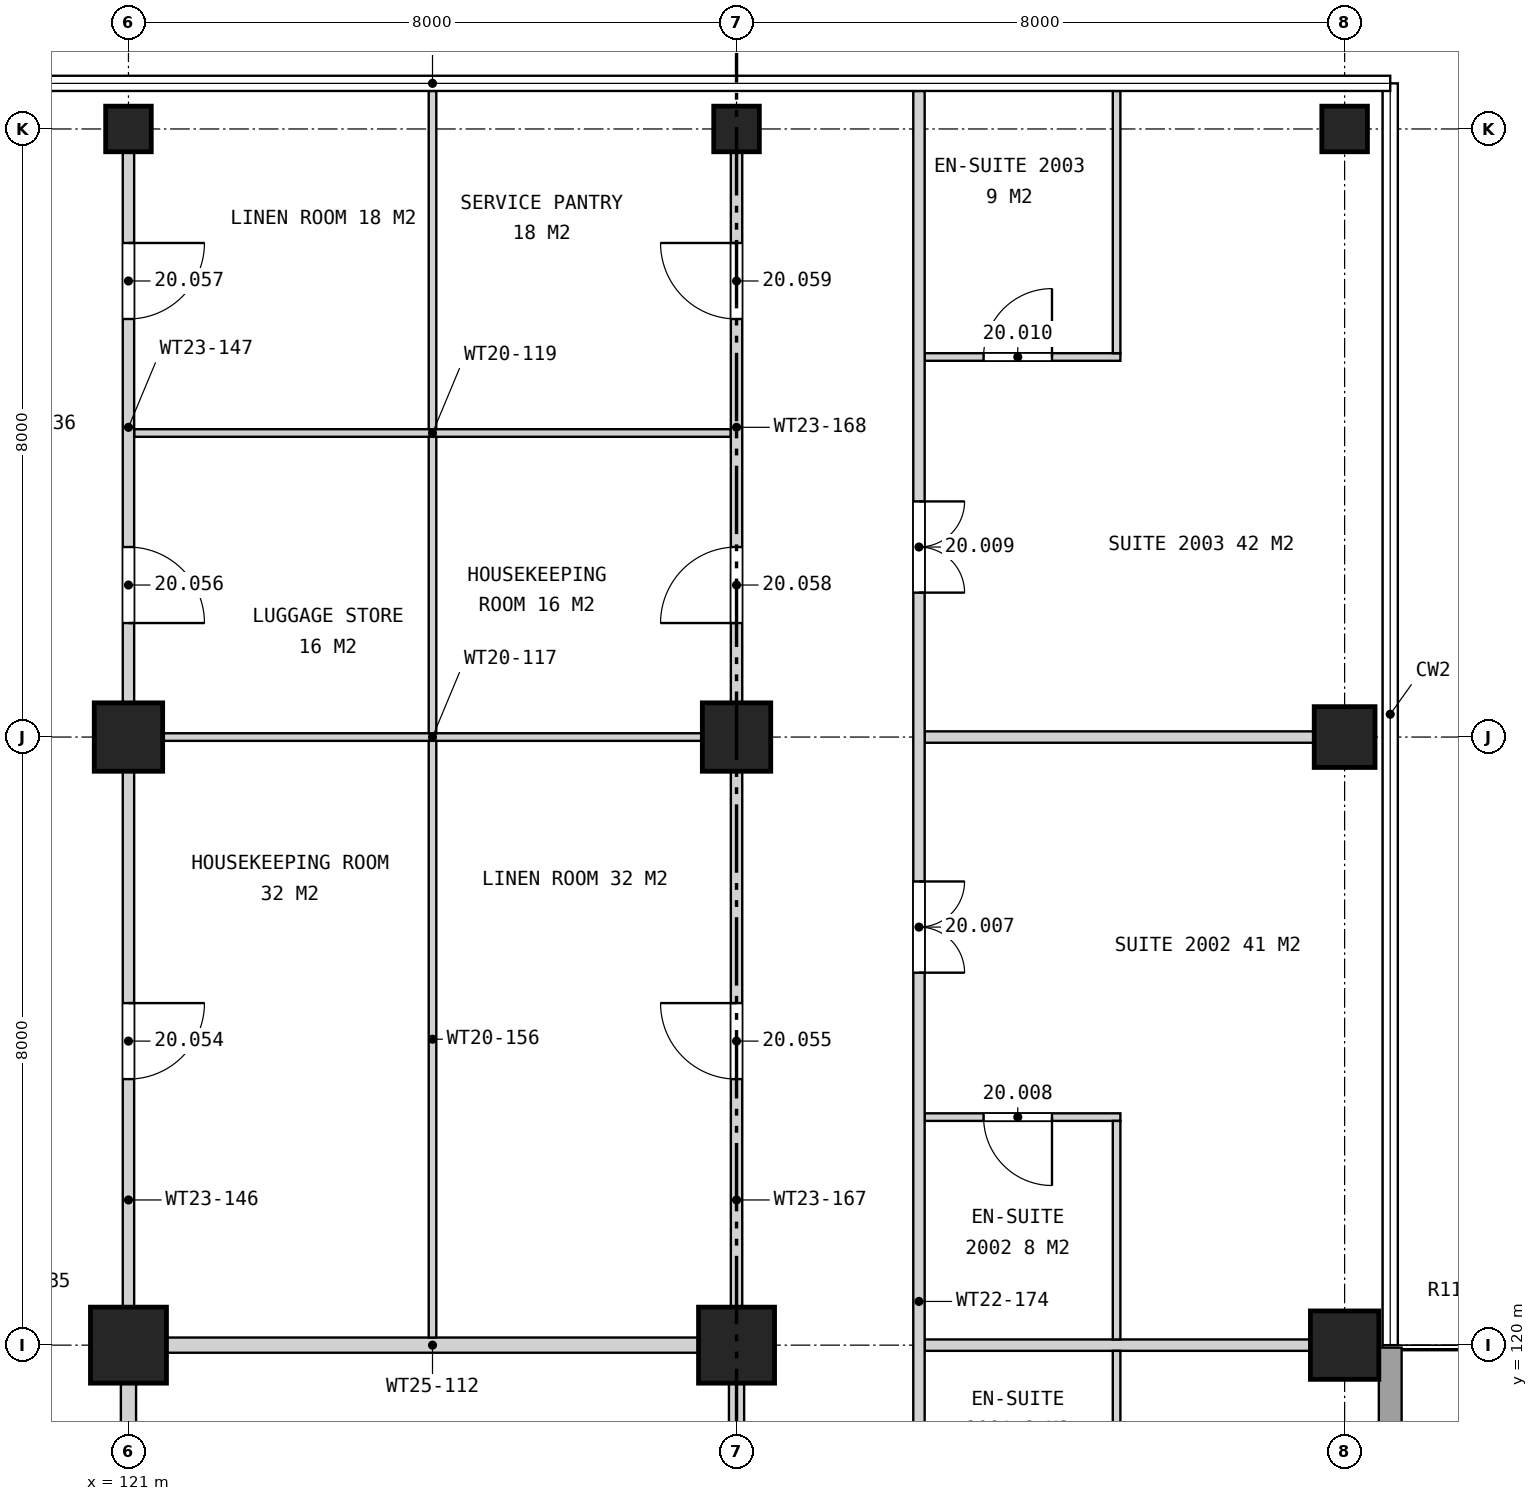
"""IFC4 building model, lengths in metres.
Left out: names, types, materials, properties, quantities, classifications, styles, units other than length and angle.
Written with IfcOpenShell. Run it as: python <this file> out.ifc"""

import sys

from ifc_helpers import new_model, si_unit, direction, frame, frame_2d, origin, origin_2d, place, context, subcontext, project, spatial, rectangle, extrude, element, fill, save


model = new_model("IFC4")
c1 = context("Model", 3, precision=1e-05, world=origin(), true_north=direction((0.0, 1.0)))
c2 = subcontext(c1, "Body", "Model", "MODEL_VIEW")
j1 = project(units=[si_unit("LENGTHUNIT", "METRE"), si_unit("PLANEANGLEUNIT", "RADIAN")], contexts=[c1])
p1 = place(None, origin())
s1 = spatial("IfcSite", under=j1, at=p1, CompositionType="ELEMENT")
p2 = place(p1, origin())
s2 = spatial("IfcBuilding", under=s1, at=p2, CompositionType="ELEMENT")
p3 = place(p2, frame((0.0, 0.0, 101.6)))
s3 = spatial("IfcBuildingStorey", under=s2, at=p3, CompositionType="ELEMENT", Elevation=101.6)
p4 = place(p3, frame((121.0, 120.0, 0.0), z_axis=(0.0, 0.0, 1.0), x_axis=(1.0, 0.0, 0.0)))
e1 = element("IfcColumn", 1, at=p4, inside=s3, PredefinedType="COLUMN", context=c2, shape_type="SweptSolid", body=[
    extrude(rectangle(XDim=1.0, YDim=1.0, at=origin_2d()), origin(), (0.0, 0.0, 1.0), 3.7),
])
p5 = place(p3, frame((121.0, 128.0, 0.0), z_axis=(0.0, 0.0, 1.0), x_axis=(1.0, 0.0, 0.0)))
e2 = element("IfcColumn", 2, at=p5, inside=s3, PredefinedType="COLUMN", context=c2, shape_type="SweptSolid", body=[
    extrude(rectangle(XDim=0.9, YDim=0.9, at=origin_2d()), origin(), (0.0, 0.0, 1.0), 3.7),
])
p6 = place(p3, frame((121.0, 136.0, 0.0), z_axis=(0.0, 0.0, 1.0), x_axis=(1.0, 0.0, 0.0)))
e3 = element("IfcColumn", 3, at=p6, inside=s3, PredefinedType="COLUMN", context=c2, shape_type="SweptSolid", body=[
    extrude(rectangle(XDim=0.6, YDim=0.6, at=origin_2d()), origin(), (0.0, 0.0, 1.0), 3.7),
])
p7 = place(p3, frame((129.0, 120.0, 0.0), z_axis=(0.0, 0.0, 1.0), x_axis=(1.0, 0.0, 0.0)))
e4 = element("IfcColumn", 4, at=p7, inside=s3, PredefinedType="COLUMN", context=c2, shape_type="SweptSolid", body=[
    extrude(rectangle(XDim=1.0, YDim=1.0, at=origin_2d()), origin(), (0.0, 0.0, 1.0), 3.7),
])
p8 = place(p3, frame((129.0, 128.0, 0.0), z_axis=(0.0, 0.0, 1.0), x_axis=(1.0, 0.0, 0.0)))
e5 = element("IfcColumn", 5, at=p8, inside=s3, PredefinedType="COLUMN", context=c2, shape_type="SweptSolid", body=[
    extrude(rectangle(XDim=0.9, YDim=0.9, at=origin_2d()), origin(), (0.0, 0.0, 1.0), 3.7),
])
p9 = place(p3, frame((129.0, 136.0, 0.0), z_axis=(0.0, 0.0, 1.0), x_axis=(1.0, 0.0, 0.0)))
e6 = element("IfcColumn", 6, at=p9, inside=s3, PredefinedType="COLUMN", context=c2, shape_type="SweptSolid", body=[
    extrude(rectangle(XDim=0.6, YDim=0.6, at=origin_2d()), origin(), (0.0, 0.0, 1.0), 3.7),
])
p10 = place(p3, frame((137.0, 120.0, 0.0), z_axis=(0.0, 0.0, 1.0), x_axis=(1.0, 0.0, 0.0)))
e7 = element("IfcColumn", 7, at=p10, inside=s3, PredefinedType="COLUMN", context=c2, shape_type="SweptSolid", body=[
    extrude(rectangle(XDim=0.9, YDim=0.9, at=origin_2d()), origin(), (0.0, 0.0, 1.0), 3.7),
])
p11 = place(p3, frame((137.0, 128.0, 0.0), z_axis=(0.0, 0.0, 1.0), x_axis=(1.0, 0.0, 0.0)))
e8 = element("IfcColumn", 8, at=p11, inside=s3, PredefinedType="COLUMN", context=c2, shape_type="SweptSolid", body=[
    extrude(rectangle(XDim=0.8, YDim=0.8, at=origin_2d()), origin(), (0.0, 0.0, 1.0), 3.7),
])
p12 = place(p3, frame((137.0, 136.0, 0.0), z_axis=(0.0, 0.0, 1.0), x_axis=(1.0, 0.0, 0.0)))
e9 = element("IfcColumn", 9, at=p12, inside=s3, PredefinedType="COLUMN", context=c2, shape_type="SweptSolid", body=[
    extrude(rectangle(XDim=0.6, YDim=0.6, at=origin_2d()), origin(), (0.0, 0.0, 1.0), 3.7),
])
p13 = place(p3, frame((137.6, 112.4, 0.0), z_axis=(0.0, 0.0, 1.0), x_axis=(0.0, 1.0, 0.0)))
e10 = element("IfcWall", 10, at=p13, inside=s3, PredefinedType="SOLIDWALL", context=c2, shape_type="SweptSolid", body=[
    extrude(rectangle(XDim=7.568, YDim=0.3, at=frame_2d((3.784, 0.0))), origin(), (0.0, 0.0, 1.0), 3.3),
])
p14 = place(p13, frame((2.55, 0.0, 0.0)))
e11 = element("IfcOpeningElement", 11, at=p14, cuts=e10, PredefinedType="OPENING", context=c2, shape_type="SweptSolid", body=[
    extrude(rectangle(XDim=2.1, YDim=2.4, at=frame_2d((1.05, 1.2))), frame((0.0, 0.16, 0.0), z_axis=(0.0, -1.0, 0.0), x_axis=(1.0, 0.0, 0.0)), (0.0, 0.0, 1.0), 0.32),
])
p15 = place(p3, frame((121.5, 120.0, 0.0), z_axis=(0.0, 0.0, 1.0), x_axis=(1.0, 0.0, 0.0)))
e12 = element("IfcWall", 12, at=p15, inside=s3, PredefinedType="PARTITIONING", context=c2, shape_type="SweptSolid", body=[
    extrude(rectangle(XDim=7.0, YDim=0.2, at=frame_2d((3.5, 0.0))), origin(), (0.0, 0.0, 1.0), 2.76),
])
p16 = place(p3, frame((131.475, 120.0, 0.0), z_axis=(0.0, 0.0, 1.0), x_axis=(1.0, 0.0, 0.0)))
e13 = element("IfcWall", 13, at=p16, inside=s3, PredefinedType="PARTITIONING", context=c2, shape_type="SweptSolid", body=[
    extrude(rectangle(XDim=5.075, YDim=0.15, at=frame_2d((2.538, 0.0))), origin(), (0.0, 0.0, 1.0), 2.76),
])
p17 = place(p3, frame((131.475, 123.0, 0.0), z_axis=(0.0, 0.0, 1.0), x_axis=(1.0, 0.0, 0.0)))
e14 = element("IfcWall", 14, at=p17, inside=s3, PredefinedType="PLUMBINGWALL", context=c2, shape_type="SweptSolid", body=[
    extrude(rectangle(XDim=2.575, YDim=0.1, at=frame_2d((1.288, 0.0))), origin(), (0.0, 0.0, 1.0), 3.7),
])
p18 = place(p17, frame((0.775, 0.0, 0.0)))
e15 = element("IfcOpeningElement", 15, at=p18, cuts=e14, PredefinedType="OPENING", context=c2, shape_type="SweptSolid", body=[
    extrude(rectangle(XDim=0.9, YDim=2.1, at=frame_2d((0.45, 1.05))), frame((0.0, 0.06, 0.0), z_axis=(0.0, -1.0, 0.0), x_axis=(1.0, 0.0, 0.0)), (0.0, 0.0, 1.0), 0.12),
])
p19 = place(p3, frame((121.45, 128.0, 0.0), z_axis=(0.0, 0.0, 1.0), x_axis=(1.0, 0.0, 0.0)))
e16 = element("IfcWall", 16, at=p19, inside=s3, PredefinedType="PARTITIONING", context=c2, shape_type="SweptSolid", body=[
    extrude(rectangle(XDim=7.1, YDim=0.1, at=frame_2d((3.55, 0.0))), origin(), (0.0, 0.0, 1.0), 2.76),
])
p20 = place(p3, frame((131.475, 128.0, 0.0), z_axis=(0.0, 0.0, 1.0), x_axis=(1.0, 0.0, 0.0)))
e17 = element("IfcWall", 17, at=p20, inside=s3, PredefinedType="PARTITIONING", context=c2, shape_type="SweptSolid", body=[
    extrude(rectangle(XDim=5.125, YDim=0.15, at=frame_2d((2.562, 0.0))), origin(), (0.0, 0.0, 1.0), 2.76),
])
p21 = place(p3, frame((121.075, 132.0, 0.0), z_axis=(0.0, 0.0, 1.0), x_axis=(1.0, 0.0, 0.0)))
e18 = element("IfcWall", 18, at=p21, inside=s3, PredefinedType="PARTITIONING", context=c2, shape_type="SweptSolid", body=[
    extrude(rectangle(XDim=7.85, YDim=0.1, at=frame_2d((3.925, 0.0))), origin(), (0.0, 0.0, 1.0), 2.843),
])
p22 = place(p3, frame((131.475, 133.0, 0.0), z_axis=(0.0, 0.0, 1.0), x_axis=(1.0, 0.0, 0.0)))
e19 = element("IfcWall", 19, at=p22, inside=s3, PredefinedType="PLUMBINGWALL", context=c2, shape_type="SweptSolid", body=[
    extrude(rectangle(XDim=2.575, YDim=0.1, at=frame_2d((1.288, 0.0))), origin(), (0.0, 0.0, 1.0), 3.7),
])
p23 = place(p22, frame((0.775, 0.0, 0.0)))
e20 = element("IfcOpeningElement", 20, at=p23, cuts=e19, PredefinedType="OPENING", context=c2, shape_type="SweptSolid", body=[
    extrude(rectangle(XDim=0.9, YDim=2.1, at=frame_2d((0.45, 1.05))), frame((0.0, 0.06, 0.0), z_axis=(0.0, -1.0, 0.0), x_axis=(1.0, 0.0, 0.0)), (0.0, 0.0, 1.0), 0.12),
])
p24 = place(p3, frame((121.0, 112.5, 0.0), z_axis=(0.0, 0.0, 1.0), x_axis=(0.0, 1.0, 0.0)))
e21 = element("IfcWall", 21, at=p24, inside=s3, PredefinedType="PARTITIONING", context=c2, shape_type="SweptSolid", body=[
    extrude(rectangle(XDim=7.0, YDim=0.2, at=frame_2d((3.5, 0.0))), origin(), (0.0, 0.0, 1.0), 2.76),
])
p25 = place(p24, frame((3.0, 0.0, 0.0)))
e22 = element("IfcOpeningElement", 22, at=p25, cuts=e21, PredefinedType="OPENING", context=c2, shape_type="SweptSolid", body=[
    extrude(rectangle(XDim=1.0, YDim=2.1, at=frame_2d((0.5, 1.05))), frame((0.0, 0.11, 0.0), z_axis=(0.0, -1.0, 0.0), x_axis=(1.0, 0.0, 0.0)), (0.0, 0.0, 1.0), 0.22),
])
p26 = place(p3, frame((121.0, 120.5, 0.0), z_axis=(0.0, 0.0, 1.0), x_axis=(0.0, 1.0, 0.0)))
e23 = element("IfcWall", 23, at=p26, inside=s3, PredefinedType="PARTITIONING", context=c2, shape_type="SweptSolid", body=[
    extrude(rectangle(XDim=7.05, YDim=0.15, at=frame_2d((3.525, 0.0))), origin(), (0.0, 0.0, 1.0), 2.76),
])
p27 = place(p26, frame((3.0, 0.0, 0.0)))
e24 = element("IfcOpeningElement", 24, at=p27, cuts=e23, PredefinedType="OPENING", context=c2, shape_type="SweptSolid", body=[
    extrude(rectangle(XDim=1.0, YDim=2.1, at=frame_2d((0.5, 1.05))), frame((0.0, 0.085, 0.0), z_axis=(0.0, -1.0, 0.0), x_axis=(1.0, 0.0, 0.0)), (0.0, 0.0, 1.0), 0.17),
])
p28 = place(p3, frame((121.0, 128.45, 0.0), z_axis=(0.0, 0.0, 1.0), x_axis=(0.0, 1.0, 0.0)))
e25 = element("IfcWall", 25, at=p28, inside=s3, PredefinedType="PARTITIONING", context=c2, shape_type="SweptSolid", body=[
    extrude(rectangle(XDim=7.25, YDim=0.15, at=frame_2d((3.625, 0.0))), origin(), (0.0, 0.0, 1.0), 2.76),
])
p29 = place(p28, frame((1.05, 0.0, 0.0)))
e26 = element("IfcOpeningElement", 26, at=p29, cuts=e25, PredefinedType="OPENING", context=c2, shape_type="SweptSolid", body=[
    extrude(rectangle(XDim=1.0, YDim=2.1, at=frame_2d((0.5, 1.05))), frame((0.0, 0.085, 0.0), z_axis=(0.0, -1.0, 0.0), x_axis=(1.0, 0.0, 0.0)), (0.0, 0.0, 1.0), 0.17),
])
p30 = place(p28, frame((5.05, 0.0, 0.0)))
e27 = element("IfcOpeningElement", 27, at=p30, cuts=e25, PredefinedType="OPENING", context=c2, shape_type="SweptSolid", body=[
    extrude(rectangle(XDim=1.0, YDim=2.1, at=frame_2d((0.5, 1.05))), frame((0.0, 0.085, 0.0), z_axis=(0.0, -1.0, 0.0), x_axis=(1.0, 0.0, 0.0)), (0.0, 0.0, 1.0), 0.17),
])
p31 = place(p3, frame((125.0, 120.1, 0.0), z_axis=(0.0, 0.0, 1.0), x_axis=(0.0, 1.0, 0.0)))
e28 = element("IfcWall", 28, at=p31, inside=s3, PredefinedType="PARTITIONING", context=c2, shape_type="SweptSolid", body=[
    extrude(rectangle(XDim=7.85, YDim=0.1, at=frame_2d((3.925, 0.0))), origin(), (0.0, 0.0, 1.0), 2.76),
])
p32 = place(p3, frame((125.0, 128.05, 0.0), z_axis=(0.0, 0.0, 1.0), x_axis=(0.0, 1.0, 0.0)))
e29 = element("IfcWall", 29, at=p32, inside=s3, PredefinedType="PARTITIONING", context=c2, shape_type="SweptSolid", body=[
    extrude(rectangle(XDim=3.9, YDim=0.1, at=frame_2d((1.95, 0.0))), origin(), (0.0, 0.0, 1.0), 2.76),
])
p33 = place(p3, frame((125.0, 132.05, 0.0), z_axis=(0.0, 0.0, 1.0), x_axis=(0.0, 1.0, 0.0)))
e30 = element("IfcWall", 30, at=p33, inside=s3, PredefinedType="PARTITIONING", context=c2, shape_type="SweptSolid", body=[
    extrude(rectangle(XDim=4.45, YDim=0.1, at=frame_2d((2.225, 0.0))), origin(), (0.0, 0.0, 1.0), 3.7),
])
p34 = place(p3, frame((129.0, 112.5, 0.0), z_axis=(0.0, 0.0, 1.0), x_axis=(0.0, 1.0, 0.0)))
e31 = element("IfcWall", 31, at=p34, inside=s3, PredefinedType="PARTITIONING", context=c2, shape_type="SweptSolid", body=[
    extrude(rectangle(XDim=7.0, YDim=0.2, at=frame_2d((3.5, 0.0))), origin(), (0.0, 0.0, 1.0), 2.76),
])
p35 = place(p3, frame((129.0, 120.5, 0.0), z_axis=(0.0, 0.0, 1.0), x_axis=(0.0, 1.0, 0.0)))
e32 = element("IfcWall", 32, at=p35, inside=s3, PredefinedType="PARTITIONING", context=c2, shape_type="SweptSolid", body=[
    extrude(rectangle(XDim=7.05, YDim=0.15, at=frame_2d((3.525, 0.0))), origin(), (0.0, 0.0, 1.0), 2.76),
])
p36 = place(p35, frame((3.0, 0.0, 0.0)))
e33 = element("IfcOpeningElement", 33, at=p36, cuts=e32, PredefinedType="OPENING", context=c2, shape_type="SweptSolid", body=[
    extrude(rectangle(XDim=1.0, YDim=2.1, at=frame_2d((0.5, 1.05))), frame((0.0, 0.085, 0.0), z_axis=(0.0, -1.0, 0.0), x_axis=(1.0, 0.0, 0.0)), (0.0, 0.0, 1.0), 0.17),
])
p37 = place(p3, frame((129.0, 128.45, 0.0), z_axis=(0.0, 0.0, 1.0), x_axis=(0.0, 1.0, 0.0)))
e34 = element("IfcWall", 34, at=p37, inside=s3, PredefinedType="PARTITIONING", context=c2, shape_type="SweptSolid", body=[
    extrude(rectangle(XDim=7.25, YDim=0.15, at=frame_2d((3.625, 0.0))), origin(), (0.0, 0.0, 1.0), 2.76),
])
p38 = place(p37, frame((1.05, 0.0, 0.0)))
e35 = element("IfcOpeningElement", 35, at=p38, cuts=e34, PredefinedType="OPENING", context=c2, shape_type="SweptSolid", body=[
    extrude(rectangle(XDim=1.0, YDim=2.1, at=frame_2d((0.5, 1.05))), frame((0.0, 0.085, 0.0), z_axis=(0.0, -1.0, 0.0), x_axis=(1.0, 0.0, 0.0)), (0.0, 0.0, 1.0), 0.17),
])
p39 = place(p37, frame((5.05, 0.0, 0.0)))
e36 = element("IfcOpeningElement", 36, at=p39, cuts=e34, PredefinedType="OPENING", context=c2, shape_type="SweptSolid", body=[
    extrude(rectangle(XDim=1.0, YDim=2.1, at=frame_2d((0.5, 1.05))), frame((0.0, 0.085, 0.0), z_axis=(0.0, -1.0, 0.0), x_axis=(1.0, 0.0, 0.0)), (0.0, 0.0, 1.0), 0.17),
])
p40 = place(p3, frame((131.4, 112.0, 0.0), z_axis=(0.0, 0.0, 1.0), x_axis=(0.0, 1.0, 0.0)))
e37 = element("IfcWall", 37, at=p40, inside=s3, PredefinedType="PARTITIONING", context=c2, shape_type="SweptSolid", body=[
    extrude(rectangle(XDim=24.5, YDim=0.15, at=frame_2d((12.25, 0.0))), origin(), (0.0, 0.0, 1.0), 2.76),
])
p41 = place(p40, frame((1.9, 0.0, 0.0)))
e38 = element("IfcOpeningElement", 38, at=p41, cuts=e37, PredefinedType="OPENING", context=c2, shape_type="SweptSolid", body=[
    extrude(rectangle(XDim=1.2, YDim=2.2, at=frame_2d((0.6, 1.1))), frame((0.0, 0.085, 0.0), z_axis=(0.0, -1.0, 0.0), x_axis=(1.0, 0.0, 0.0)), (0.0, 0.0, 1.0), 0.17),
])
p42 = place(p40, frame((12.9, 0.0, 0.0)))
e39 = element("IfcOpeningElement", 39, at=p42, cuts=e37, PredefinedType="OPENING", context=c2, shape_type="SweptSolid", body=[
    extrude(rectangle(XDim=1.2, YDim=2.2, at=frame_2d((0.6, 1.1))), frame((0.0, 0.085, 0.0), z_axis=(0.0, -1.0, 0.0), x_axis=(1.0, 0.0, 0.0)), (0.0, 0.0, 1.0), 0.17),
])
p43 = place(p40, frame((17.9, 0.0, 0.0)))
e40 = element("IfcOpeningElement", 40, at=p43, cuts=e37, PredefinedType="OPENING", context=c2, shape_type="SweptSolid", body=[
    extrude(rectangle(XDim=1.2, YDim=2.2, at=frame_2d((0.6, 1.1))), frame((0.0, 0.085, 0.0), z_axis=(0.0, -1.0, 0.0), x_axis=(1.0, 0.0, 0.0)), (0.0, 0.0, 1.0), 0.17),
])
for number, where, z_axis, x_axis in (
    (41, (134.0, 117.05, 0.0), (0.0, 0.0, 1.0), (0.0, 1.0, 0.0)),
    (42, (134.0, 120.075, 0.0), (0.0, 0.0, 1.0), (0.0, 1.0, 0.0)),
):
    element("IfcWall", number, at=place(p3, frame(where, z_axis=z_axis, x_axis=x_axis)), inside=s3, PredefinedType="PLUMBINGWALL", context=c2, shape_type="SweptSolid", body=[
        extrude(rectangle(XDim=2.875, YDim=0.1, at=frame_2d((1.438, 0.0))), origin(), (0.0, 0.0, 1.0), 3.7),
    ])
p44 = place(p3, frame((134.0, 133.05, 0.0), z_axis=(0.0, 0.0, 1.0), x_axis=(0.0, 1.0, 0.0)))
e43 = element("IfcWall", 43, at=p44, inside=s3, PredefinedType="PLUMBINGWALL", context=c2, shape_type="SweptSolid", body=[
    extrude(rectangle(XDim=3.45, YDim=0.1, at=frame_2d((1.725, 0.0))), origin(), (0.0, 0.0, 1.0), 3.7),
])
p45 = place(p42, frame((1.2, 0.0, 0.0), z_axis=(0.0, 0.0, 1.0), x_axis=(-1.0, 0.0, 0.0)))
e44 = element("IfcDoor", 44, at=p45, inside=s3, OperationType="DOUBLE_DOOR_SINGLE_SWING", PredefinedType="DOOR", context=c2, shape_type="SweptSolid", body=[
    extrude(rectangle(XDim=1.2, YDim=2.2, at=frame_2d((0.6, 1.1))), frame((0.0, 0.025, 0.0), z_axis=(0.0, -1.0, 0.0), x_axis=(1.0, 0.0, 0.0)), (0.0, 0.0, 1.0), 0.05),
])
fill(e39, e44)
p46 = place(p18, frame((0.9, 0.0, 0.0), z_axis=(0.0, 0.0, 1.0), x_axis=(-1.0, 0.0, 0.0)))
e45 = element("IfcDoor", 45, at=p46, inside=s3, OperationType="SINGLE_SWING_LEFT", PredefinedType="DOOR", context=c2, shape_type="SweptSolid", body=[
    extrude(rectangle(XDim=0.9, YDim=2.1, at=frame_2d((0.45, 1.05))), frame((0.0, 0.025, 0.0), z_axis=(0.0, -1.0, 0.0), x_axis=(1.0, 0.0, 0.0)), (0.0, 0.0, 1.0), 0.05),
])
fill(e15, e45)
p47 = place(p43, frame((1.2, 0.0, 0.0), z_axis=(0.0, 0.0, 1.0), x_axis=(-1.0, 0.0, 0.0)))
e46 = element("IfcDoor", 46, at=p47, inside=s3, OperationType="DOUBLE_DOOR_SINGLE_SWING", PredefinedType="DOOR", context=c2, shape_type="SweptSolid", body=[
    extrude(rectangle(XDim=1.2, YDim=2.2, at=frame_2d((0.6, 1.1))), frame((0.0, 0.025, 0.0), z_axis=(0.0, -1.0, 0.0), x_axis=(1.0, 0.0, 0.0)), (0.0, 0.0, 1.0), 0.05),
])
fill(e40, e46)
p48 = place(p23, origin())
e47 = element("IfcDoor", 47, at=p48, inside=s3, OperationType="SINGLE_SWING_RIGHT", PredefinedType="DOOR", context=c2, shape_type="SweptSolid", body=[
    extrude(rectangle(XDim=0.9, YDim=2.1, at=frame_2d((0.45, 1.05))), frame((0.0, 0.025, 0.0), z_axis=(0.0, -1.0, 0.0), x_axis=(1.0, 0.0, 0.0)), (0.0, 0.0, 1.0), 0.05),
])
fill(e20, e47)
p49 = place(p27, frame((1.0, 0.0, 0.0), z_axis=(0.0, 0.0, 1.0), x_axis=(-1.0, 0.0, 0.0)))
e48 = element("IfcDoor", 48, at=p49, inside=s3, OperationType="SINGLE_SWING_LEFT", PredefinedType="DOOR", context=c2, shape_type="SweptSolid", body=[
    extrude(rectangle(XDim=1.0, YDim=2.1, at=frame_2d((0.5, 1.05))), frame((0.0, 0.025, 0.0), z_axis=(0.0, -1.0, 0.0), x_axis=(1.0, 0.0, 0.0)), (0.0, 0.0, 1.0), 0.05),
])
fill(e24, e48)
p50 = place(p36, origin())
e49 = element("IfcDoor", 49, at=p50, inside=s3, OperationType="SINGLE_SWING_RIGHT", PredefinedType="DOOR", context=c2, shape_type="SweptSolid", body=[
    extrude(rectangle(XDim=1.0, YDim=2.1, at=frame_2d((0.5, 1.05))), frame((0.0, 0.025, 0.0), z_axis=(0.0, -1.0, 0.0), x_axis=(1.0, 0.0, 0.0)), (0.0, 0.0, 1.0), 0.05),
])
fill(e33, e49)
p51 = place(p29, frame((1.0, 0.0, 0.0), z_axis=(0.0, 0.0, 1.0), x_axis=(-1.0, 0.0, 0.0)))
e50 = element("IfcDoor", 50, at=p51, inside=s3, OperationType="SINGLE_SWING_RIGHT", PredefinedType="DOOR", context=c2, shape_type="SweptSolid", body=[
    extrude(rectangle(XDim=1.0, YDim=2.1, at=frame_2d((0.5, 1.05))), frame((0.0, 0.025, 0.0), z_axis=(0.0, -1.0, 0.0), x_axis=(1.0, 0.0, 0.0)), (0.0, 0.0, 1.0), 0.05),
])
fill(e26, e50)
p52 = place(p30, frame((1.0, 0.0, 0.0), z_axis=(0.0, 0.0, 1.0), x_axis=(-1.0, 0.0, 0.0)))
e51 = element("IfcDoor", 51, at=p52, inside=s3, OperationType="SINGLE_SWING_LEFT", PredefinedType="DOOR", context=c2, shape_type="SweptSolid", body=[
    extrude(rectangle(XDim=1.0, YDim=2.1, at=frame_2d((0.5, 1.05))), frame((0.0, 0.025, 0.0), z_axis=(0.0, -1.0, 0.0), x_axis=(1.0, 0.0, 0.0)), (0.0, 0.0, 1.0), 0.05),
])
fill(e27, e51)
p53 = place(p38, origin())
e52 = element("IfcDoor", 52, at=p53, inside=s3, OperationType="SINGLE_SWING_LEFT", PredefinedType="DOOR", context=c2, shape_type="SweptSolid", body=[
    extrude(rectangle(XDim=1.0, YDim=2.1, at=frame_2d((0.5, 1.05))), frame((0.0, 0.025, 0.0), z_axis=(0.0, -1.0, 0.0), x_axis=(1.0, 0.0, 0.0)), (0.0, 0.0, 1.0), 0.05),
])
fill(e35, e52)
p54 = place(p39, origin())
e53 = element("IfcDoor", 53, at=p54, inside=s3, OperationType="SINGLE_SWING_RIGHT", PredefinedType="DOOR", context=c2, shape_type="SweptSolid", body=[
    extrude(rectangle(XDim=1.0, YDim=2.1, at=frame_2d((0.5, 1.05))), frame((0.0, 0.025, 0.0), z_axis=(0.0, -1.0, 0.0), x_axis=(1.0, 0.0, 0.0)), (0.0, 0.0, 1.0), 0.05),
])
fill(e36, e53)
save(model, sys.argv[1])
